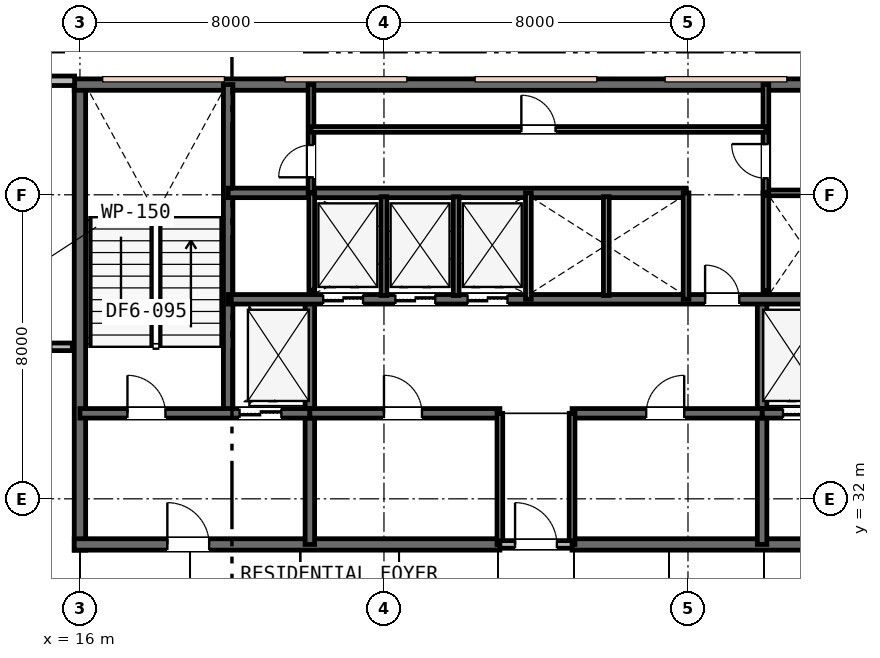
"""IFC4 building model, lengths in metres.
Left out: names, types, materials, properties, quantities, classifications, styles, units other than length and angle.
Written with IfcOpenShell. Run it as: python <this file> out.ifc"""

import sys

from ifc_helpers import new_model, si_unit, direction, frame, frame_2d, origin, place, context, subcontext, project, spatial, rectangle, extrude, element, fill, save


model = new_model("IFC4")
c1 = context("Model", 3, precision=1e-05, world=origin(), true_north=direction((0.0, 1.0)))
c2 = subcontext(c1, "Body", "Model", "MODEL_VIEW")
j1 = project(units=[si_unit("LENGTHUNIT", "METRE"), si_unit("PLANEANGLEUNIT", "RADIAN")], contexts=[c1])
p1 = place(None, origin())
s1 = spatial("IfcSite", under=j1, at=p1, CompositionType="ELEMENT")
p2 = place(p1, origin())
s2 = spatial("IfcBuilding", under=s1, at=p2, CompositionType="ELEMENT")
p3 = place(p2, frame((0.0, 0.0, 271.6)))
s3 = spatial("IfcBuildingStorey", under=s2, at=p3, CompositionType="ELEMENT", Elevation=271.6)
p4 = place(p3, frame((16.0, 30.65, 0.0), z_axis=(0.0, 0.0, 1.0), x_axis=(0.0, 1.0, 0.0)))
e1 = element("IfcWall", 1, at=p4, inside=s3, PredefinedType="SHEAR", context=c2, shape_type="SweptSolid", body=[
    extrude(rectangle(XDim=12.3, YDim=0.3, at=frame_2d((6.15, 0.0))), origin(), (0.0, 0.0, 1.0), 3.8),
])
p5 = place(p3, frame((15.85, 42.9, 0.0), z_axis=(0.0, 0.0, 1.0), x_axis=(1.0, 0.0, 0.0)))
e2 = element("IfcWall", 2, at=p5, inside=s3, PredefinedType="SHEAR", context=c2, shape_type="SweptSolid", body=[
    extrude(rectangle(XDim=24.3, YDim=0.3, at=frame_2d((12.15, 0.0))), origin(), (0.0, 0.0, 1.0), 3.8),
])
p6 = place(p3, frame((15.85, 30.8, 0.0), z_axis=(0.0, 0.0, 1.0), x_axis=(1.0, 0.0, 0.0)))
e3 = element("IfcWall", 3, at=p6, inside=s3, PredefinedType="SHEAR", context=c2, shape_type="SweptSolid", body=[
    extrude(rectangle(XDim=11.2, YDim=0.3, at=frame_2d((5.6, 0.0))), origin(), (0.0, 0.0, 1.0), 3.8),
])
p7 = place(p6, frame((2.45, 0.0, 0.0)))
e4 = element("IfcOpeningElement", 4, at=p7, cuts=e3, PredefinedType="OPENING", context=c2, shape_type="SweptSolid", body=[
    extrude(rectangle(XDim=1.1, YDim=2.15, at=frame_2d((0.55, 1.075))), frame((0.0, 0.16, 0.0), z_axis=(0.0, -1.0, 0.0), x_axis=(1.0, 0.0, 0.0)), (0.0, 0.0, 1.0), 0.32),
])
p8 = place(p3, frame((28.95, 30.8, 0.0), z_axis=(0.0, 0.0, 1.0), x_axis=(1.0, 0.0, 0.0)))
e5 = element("IfcWall", 5, at=p8, inside=s3, PredefinedType="SHEAR", context=c2, shape_type="SweptSolid", body=[
    extrude(rectangle(XDim=11.2, YDim=0.3, at=frame_2d((5.6, 0.0))), origin(), (0.0, 0.0, 1.0), 3.8),
])
p9 = place(p8, frame((7.65, 0.0, 0.0)))
e6 = element("IfcOpeningElement", 6, at=p9, cuts=e5, PredefinedType="OPENING", context=c2, shape_type="SweptSolid", body=[
    extrude(rectangle(XDim=1.1, YDim=2.15, at=frame_2d((0.55, 1.075))), frame((0.0, 0.16, 0.0), z_axis=(0.0, -1.0, 0.0), x_axis=(1.0, 0.0, 0.0)), (0.0, 0.0, 1.0), 0.32),
])
p10 = place(p3, frame((19.9, 34.25, 0.0), z_axis=(0.0, 0.0, 1.0), x_axis=(0.0, 1.0, 0.0)))
e7 = element("IfcWall", 7, at=p10, inside=s3, PredefinedType="SHEAR", context=c2, shape_type="SweptSolid", body=[
    extrude(rectangle(XDim=8.65, YDim=0.25, at=frame_2d((4.325, 0.0))), origin(), (0.0, 0.0, 1.0), 3.8),
])
for number, where, z_axis, x_axis in (
    (8, (22.05, 30.8, 0.0), (0.0, 0.0, 1.0), (0.0, 1.0, 0.0)),
    (9, (33.95, 30.8, 0.0), (0.0, 0.0, 1.0), (0.0, 1.0, 0.0)),
):
    element("IfcWall", number, at=place(p3, frame(where, z_axis=z_axis, x_axis=x_axis)), inside=s3, PredefinedType="SHEAR", context=c2, shape_type="SweptSolid", body=[
        extrude(rectangle(XDim=6.45, YDim=0.25, at=frame_2d((3.225, 0.0))), origin(), (0.0, 0.0, 1.0), 3.8),
    ])
p11 = place(p3, frame((16.0, 34.25, 0.0), z_axis=(0.0, 0.0, 1.0), x_axis=(1.0, 0.0, 0.0)))
e10 = element("IfcWall", 10, at=p11, inside=s3, PredefinedType="SHEAR", context=c2, shape_type="SweptSolid", body=[
    extrude(rectangle(XDim=6.05, YDim=0.25, at=frame_2d((3.025, 0.0))), origin(), (0.0, 0.0, 1.0), 3.8),
])
p12 = place(p11, frame((1.25, 0.0, 0.0)))
e11 = element("IfcOpeningElement", 11, at=p12, cuts=e10, PredefinedType="OPENING", context=c2, shape_type="SweptSolid", body=[
    extrude(rectangle(XDim=1.0, YDim=2.15, at=frame_2d((0.5, 1.075))), frame((0.0, 0.135, 0.0), z_axis=(0.0, -1.0, 0.0), x_axis=(1.0, 0.0, 0.0)), (0.0, 0.0, 1.0), 0.27),
])
p13 = place(p11, frame((4.2, 0.0, 0.0)))
e12 = element("IfcOpeningElement", 12, at=p13, cuts=e10, PredefinedType="OPENING", context=c2, shape_type="SweptSolid", body=[
    extrude(rectangle(XDim=1.1, YDim=2.15, at=frame_2d((0.55, 1.075))), frame((0.0, 0.135, 0.0), z_axis=(0.0, -1.0, 0.0), x_axis=(1.0, 0.0, 0.0)), (0.0, 0.0, 1.0), 0.27),
])
p14 = place(p3, frame((33.95, 34.25, 0.0), z_axis=(0.0, 0.0, 1.0), x_axis=(1.0, 0.0, 0.0)))
e13 = element("IfcWall", 13, at=p14, inside=s3, PredefinedType="SHEAR", context=c2, shape_type="SweptSolid", body=[
    extrude(rectangle(XDim=6.05, YDim=0.25, at=frame_2d((3.025, 0.0))), origin(), (0.0, 0.0, 1.0), 3.8),
])
p15 = place(p14, frame((3.7, 0.0, 0.0)))
e14 = element("IfcOpeningElement", 14, at=p15, cuts=e13, PredefinedType="OPENING", context=c2, shape_type="SweptSolid", body=[
    extrude(rectangle(XDim=1.0, YDim=2.15, at=frame_2d((0.5, 1.075))), frame((0.0, 0.135, 0.0), z_axis=(0.0, -1.0, 0.0), x_axis=(1.0, 0.0, 0.0)), (0.0, 0.0, 1.0), 0.27),
])
p16 = place(p14, frame((0.55, 0.0, 0.0)))
e15 = element("IfcOpeningElement", 15, at=p16, cuts=e13, PredefinedType="OPENING", context=c2, shape_type="SweptSolid", body=[
    extrude(rectangle(XDim=1.1, YDim=2.15, at=frame_2d((0.55, 1.075))), frame((0.0, 0.135, 0.0), z_axis=(0.0, -1.0, 0.0), x_axis=(1.0, 0.0, 0.0)), (0.0, 0.0, 1.0), 0.27),
])
p17 = place(p3, frame((22.05, 34.25, 0.0), z_axis=(0.0, 0.0, 1.0), x_axis=(1.0, 0.0, 0.0)))
e16 = element("IfcWall", 16, at=p17, inside=s3, PredefinedType="SHEAR", context=c2, shape_type="SweptSolid", body=[
    extrude(rectangle(XDim=5.0, YDim=0.25, at=frame_2d((2.5, 0.0))), origin(), (0.0, 0.0, 1.0), 3.8),
])
p18 = place(p17, frame((1.95, 0.0, 0.0)))
e17 = element("IfcOpeningElement", 17, at=p18, cuts=e16, PredefinedType="OPENING", context=c2, shape_type="SweptSolid", body=[
    extrude(rectangle(XDim=1.0, YDim=2.15, at=frame_2d((0.5, 1.075))), frame((0.0, 0.135, 0.0), z_axis=(0.0, -1.0, 0.0), x_axis=(1.0, 0.0, 0.0)), (0.0, 0.0, 1.0), 0.27),
])
p19 = place(p3, frame((28.95, 34.25, 0.0), z_axis=(0.0, 0.0, 1.0), x_axis=(1.0, 0.0, 0.0)))
e18 = element("IfcWall", 18, at=p19, inside=s3, PredefinedType="SHEAR", context=c2, shape_type="SweptSolid", body=[
    extrude(rectangle(XDim=5.0, YDim=0.25, at=frame_2d((2.5, 0.0))), origin(), (0.0, 0.0, 1.0), 3.8),
])
p20 = place(p19, frame((1.95, 0.0, 0.0)))
e19 = element("IfcOpeningElement", 19, at=p20, cuts=e18, PredefinedType="OPENING", context=c2, shape_type="SweptSolid", body=[
    extrude(rectangle(XDim=1.0, YDim=2.15, at=frame_2d((0.5, 1.075))), frame((0.0, 0.135, 0.0), z_axis=(0.0, -1.0, 0.0), x_axis=(1.0, 0.0, 0.0)), (0.0, 0.0, 1.0), 0.27),
])
p21 = place(p3, frame((19.9, 37.25, 0.0), z_axis=(0.0, 0.0, 1.0), x_axis=(1.0, 0.0, 0.0)))
e20 = element("IfcWall", 20, at=p21, inside=s3, PredefinedType="SHEAR", context=c2, shape_type="SweptSolid", body=[
    extrude(rectangle(XDim=16.2, YDim=0.25, at=frame_2d((8.1, 0.0))), origin(), (0.0, 0.0, 1.0), 3.8),
])
p22 = place(p21, frame((12.55, 0.0, 0.0)))
e21 = element("IfcOpeningElement", 21, at=p22, cuts=e20, PredefinedType="OPENING", context=c2, shape_type="SweptSolid", body=[
    extrude(rectangle(XDim=0.9, YDim=2.15, at=frame_2d((0.45, 1.075))), frame((0.0, 0.135, 0.0), z_axis=(0.0, -1.0, 0.0), x_axis=(1.0, 0.0, 0.0)), (0.0, 0.0, 1.0), 0.27),
])
p23 = place(p21, frame((2.5, 0.0, 0.0)))
e22 = element("IfcOpeningElement", 22, at=p23, cuts=e20, PredefinedType="OPENING", context=c2, shape_type="SweptSolid", body=[
    extrude(rectangle(XDim=1.05, YDim=2.15, at=frame_2d((0.525, 1.075))), frame((0.0, 0.135, 0.0), z_axis=(0.0, -1.0, 0.0), x_axis=(1.0, 0.0, 0.0)), (0.0, 0.0, 1.0), 0.27),
])
p24 = place(p21, frame((4.4, 0.0, 0.0)))
e23 = element("IfcOpeningElement", 23, at=p24, cuts=e20, PredefinedType="OPENING", context=c2, shape_type="SweptSolid", body=[
    extrude(rectangle(XDim=1.05, YDim=2.15, at=frame_2d((0.525, 1.075))), frame((0.0, 0.135, 0.0), z_axis=(0.0, -1.0, 0.0), x_axis=(1.0, 0.0, 0.0)), (0.0, 0.0, 1.0), 0.27),
])
p25 = place(p21, frame((6.3, 0.0, 0.0)))
e24 = element("IfcOpeningElement", 24, at=p25, cuts=e20, PredefinedType="OPENING", context=c2, shape_type="SweptSolid", body=[
    extrude(rectangle(XDim=1.05, YDim=2.15, at=frame_2d((0.525, 1.075))), frame((0.0, 0.135, 0.0), z_axis=(0.0, -1.0, 0.0), x_axis=(1.0, 0.0, 0.0)), (0.0, 0.0, 1.0), 0.27),
])
p26 = place(p3, frame((19.9, 40.05, 0.0), z_axis=(0.0, 0.0, 1.0), x_axis=(1.0, 0.0, 0.0)))
e25 = element("IfcWall", 25, at=p26, inside=s3, PredefinedType="SHEAR", context=c2, shape_type="SweptSolid", body=[
    extrude(rectangle(XDim=12.05, YDim=0.25, at=frame_2d((6.025, 0.0))), origin(), (0.0, 0.0, 1.0), 3.8),
])
p27 = place(p3, frame((15.86, 43.0, 0.0), z_axis=(0.0, 0.0, 1.0), x_axis=(-1.0, 0.0, 0.0)))
e26 = element("IfcWall", 26, at=p27, inside=s3, PredefinedType="STANDARD", context=c2, shape_type="SweptSolid", body=[
    extrude(rectangle(XDim=4.06, YDim=0.25, at=frame_2d((2.03, 0.0))), origin(), (0.0, 0.0, 1.0), 3.53),
])
p28 = place(p27, frame((1.14, 0.0, 0.85)))
e27 = element("IfcOpeningElement", 27, at=p28, cuts=e26, PredefinedType="OPENING", context=c2, shape_type="SweptSolid", body=[
    extrude(rectangle(XDim=1.2, YDim=1.6, at=frame_2d((0.6, 0.8))), frame((0.0, 0.135, 0.0), z_axis=(0.0, -1.0, 0.0), x_axis=(1.0, 0.0, 0.0)), (0.0, 0.0, 1.0), 0.27),
])
for number, where, z_axis, x_axis in (
    (28, (27.05, 30.8, 0.0), (0.0, 0.0, 1.0), (0.0, 1.0, 0.0)),
    (29, (28.95, 30.8, 0.0), (0.0, 0.0, 1.0), (0.0, 1.0, 0.0)),
):
    element("IfcWall", number, at=place(p3, frame(where, z_axis=z_axis, x_axis=x_axis)), inside=s3, PredefinedType="PLUMBINGWALL", context=c2, shape_type="SweptSolid", body=[
        extrude(rectangle(XDim=3.45, YDim=0.15, at=frame_2d((1.725, 0.0))), origin(), (0.0, 0.0, 1.0), 3.28),
    ])
p29 = place(p3, frame((27.05, 30.8, 0.0), z_axis=(0.0, 0.0, 1.0), x_axis=(1.0, 0.0, 0.0)))
e30 = element("IfcWall", 30, at=p29, inside=s3, PredefinedType="PARTITIONING", context=c2, shape_type="SweptSolid", body=[
    extrude(rectangle(XDim=1.9, YDim=0.2, at=frame_2d((0.95, 0.0))), origin(), (0.0, 0.0, 1.0), 3.28),
])
p30 = place(p29, frame((0.4, 0.0, 0.0)))
e31 = element("IfcOpeningElement", 31, at=p30, cuts=e30, PredefinedType="OPENING", context=c2, shape_type="SweptSolid", body=[
    extrude(rectangle(XDim=1.1, YDim=2.15, at=frame_2d((0.55, 1.075))), frame((0.0, 0.11, 0.0), z_axis=(0.0, -1.0, 0.0), x_axis=(1.0, 0.0, 0.0)), (0.0, 0.0, 1.0), 0.22),
])
p31 = place(p3, frame((22.1, 37.49, 0.0), z_axis=(0.0, 0.0, 1.0), x_axis=(0.0, 1.0, 0.0)))
e32 = element("IfcWall", 32, at=p31, inside=s3, PredefinedType="PLUMBINGWALL", context=c2, shape_type="SweptSolid", body=[
    extrude(rectangle(XDim=2.56, YDim=0.15, at=frame_2d((1.28, 0.0))), origin(), (0.0, 0.0, 1.0), 3.53),
])
p32 = place(p3, frame((27.8, 37.25, 0.0), z_axis=(0.0, 0.0, 1.0), x_axis=(0.0, 1.0, 0.0)))
e33 = element("IfcWall", 33, at=p32, inside=s3, PredefinedType="PLUMBINGWALL", context=c2, shape_type="SweptSolid", body=[
    extrude(rectangle(XDim=2.8, YDim=0.15, at=frame_2d((1.4, 0.0))), origin(), (0.0, 0.0, 1.0), 3.53),
])
for number, where, z_axis, x_axis in (
    (34, (24.0, 37.35, 0.0), (0.0, 0.0, 1.0), (0.0, 1.0, 0.0)),
    (35, (25.9, 37.35, 0.0), (0.0, 0.0, 1.0), (0.0, 1.0, 0.0)),
):
    element("IfcWall", number, at=place(p3, frame(where, z_axis=z_axis, x_axis=x_axis)), inside=s3, PredefinedType="PLUMBINGWALL", context=c2, shape_type="SweptSolid", body=[
        extrude(rectangle(XDim=2.6, YDim=0.15, at=frame_2d((1.3, 0.0))), origin(), (0.0, 0.0, 1.0), 3.53),
    ])
p33 = place(p3, frame((31.95, 37.25, 0.0), z_axis=(0.0, 0.0, 1.0), x_axis=(0.0, 1.0, 0.0)))
e36 = element("IfcWall", 36, at=p33, inside=s3, PredefinedType="PLUMBINGWALL", context=c2, shape_type="SweptSolid", body=[
    extrude(rectangle(XDim=2.8, YDim=0.15, at=frame_2d((1.4, 0.0))), origin(), (0.0, 0.0, 1.0), 3.53),
])
p34 = place(p3, frame((29.85, 37.35, 0.0), z_axis=(0.0, 0.0, 1.0), x_axis=(0.0, 1.0, 0.0)))
e37 = element("IfcWall", 37, at=p34, inside=s3, PredefinedType="PLUMBINGWALL", context=c2, shape_type="SweptSolid", body=[
    extrude(rectangle(XDim=2.6, YDim=0.15, at=frame_2d((1.3, 0.0))), origin(), (0.0, 0.0, 1.0), 3.53),
])
p35 = place(p3, frame((34.05, 37.473, 0.0), z_axis=(0.0, 0.0, 1.0), x_axis=(0.0, 1.0, 0.0)))
e38 = element("IfcWall", 38, at=p35, inside=s3, PredefinedType="PLUMBINGWALL", context=c2, shape_type="SweptSolid", body=[
    extrude(rectangle(XDim=2.577, YDim=0.15, at=frame_2d((1.288, 0.0))), origin(), (0.0, 0.0, 1.0), 3.53),
])
p36 = place(p3, frame((34.05, 40.05, 0.0), z_axis=(0.0, 0.0, 1.0), x_axis=(1.0, 0.0, 0.0)))
e39 = element("IfcWall", 39, at=p36, inside=s3, PredefinedType="PARTITIONING", context=c2, shape_type="SweptSolid", body=[
    extrude(rectangle(XDim=2.05, YDim=0.15, at=frame_2d((1.025, 0.0))), origin(), (0.0, 0.0, 1.0), 3.53),
])
p37 = place(p3, frame((34.05, 40.05, 0.0), z_axis=(0.0, 0.0, 1.0), x_axis=(0.0, 1.0, 0.0)))
e40 = element("IfcWall", 40, at=p37, inside=s3, PredefinedType="PARTITIONING", context=c2, shape_type="SweptSolid", body=[
    extrude(rectangle(XDim=2.85, YDim=0.15, at=frame_2d((1.425, 0.0))), origin(), (0.0, 0.0, 1.0), 3.53),
])
p38 = place(p37, frame((0.385, 0.0, 0.0)))
e41 = element("IfcOpeningElement", 41, at=p38, cuts=e40, PredefinedType="OPENING", context=c2, shape_type="SweptSolid", body=[
    extrude(rectangle(XDim=0.9, YDim=2.15, at=frame_2d((0.45, 1.075))), frame((0.0, 0.085, 0.0), z_axis=(0.0, -1.0, 0.0), x_axis=(1.0, 0.0, 0.0)), (0.0, 0.0, 1.0), 0.17),
])
p39 = place(p3, frame((22.08, 40.05, 0.0), z_axis=(0.0, 0.0, 1.0), x_axis=(0.0, 1.0, 0.0)))
e42 = element("IfcWall", 42, at=p39, inside=s3, PredefinedType="PARTITIONING", context=c2, shape_type="SweptSolid", body=[
    extrude(rectangle(XDim=2.85, YDim=0.15, at=frame_2d((1.425, 0.0))), origin(), (0.0, 0.0, 1.0), 3.53),
])
p40 = place(p39, frame((0.41, 0.0, 0.0)))
e43 = element("IfcOpeningElement", 43, at=p40, cuts=e42, PredefinedType="OPENING", context=c2, shape_type="SweptSolid", body=[
    extrude(rectangle(XDim=0.85, YDim=2.15, at=frame_2d((0.425, 1.075))), frame((0.0, 0.085, 0.0), z_axis=(0.0, -1.0, 0.0), x_axis=(1.0, 0.0, 0.0)), (0.0, 0.0, 1.0), 0.17),
])
p41 = place(p3, frame((22.08, 41.72, 0.0), z_axis=(0.0, 0.0, 1.0), x_axis=(1.0, 0.0, 0.0)))
e44 = element("IfcWall", 44, at=p41, inside=s3, PredefinedType="PARTITIONING", context=c2, shape_type="SweptSolid", body=[
    extrude(rectangle(XDim=11.97, YDim=0.15, at=frame_2d((5.985, 0.0))), origin(), (0.0, 0.0, 1.0), 3.53),
])
p42 = place(p41, frame((5.535, 0.0, 0.0)))
e45 = element("IfcOpeningElement", 45, at=p42, cuts=e44, PredefinedType="OPENING", context=c2, shape_type="SweptSolid", body=[
    extrude(rectangle(XDim=0.9, YDim=2.15, at=frame_2d((0.45, 1.075))), frame((0.0, 0.085, 0.0), z_axis=(0.0, -1.0, 0.0), x_axis=(1.0, 0.0, 0.0)), (0.0, 0.0, 1.0), 0.17),
])
p43 = place(p3, frame((9.3, 36.0, 0.0), z_axis=(0.0, 0.0, 1.0), x_axis=(1.0, 0.0, 0.0)))
e46 = element("IfcWall", 46, at=p43, inside=s3, PredefinedType="PARTITIONING", context=c2, shape_type="SweptSolid", body=[
    extrude(rectangle(XDim=6.5, YDim=0.2, at=frame_2d((3.25, 0.0))), origin(), (0.0, 0.0, 1.0), 3.53),
])
p44 = place(p43, frame((4.995, 0.0, 0.0)))
e47 = element("IfcOpeningElement", 47, at=p44, cuts=e46, PredefinedType="OPENING", context=c2, shape_type="SweptSolid", body=[
    extrude(rectangle(XDim=0.95, YDim=2.15, at=frame_2d((0.475, 1.075))), frame((0.0, 0.11, 0.0), z_axis=(0.0, -1.0, 0.0), x_axis=(1.0, 0.0, 0.0)), (0.0, 0.0, 1.0), 0.22),
])
p45 = place(p30, origin())
e48 = element("IfcDoor", 48, at=p45, inside=s3, OperationType="SINGLE_SWING_LEFT", PredefinedType="DOOR", context=c2, shape_type="SweptSolid", body=[
    extrude(rectangle(XDim=1.1, YDim=2.15, at=frame_2d((0.55, 1.075))), frame((0.0, 0.025, 0.0), z_axis=(0.0, -1.0, 0.0), x_axis=(1.0, 0.0, 0.0)), (0.0, 0.0, 1.0), 0.05),
])
fill(e31, e48)
p46 = place(p12, origin())
e49 = element("IfcDoor", 49, at=p46, inside=s3, OperationType="SINGLE_SWING_LEFT", PredefinedType="DOOR", context=c2, shape_type="SweptSolid", body=[
    extrude(rectangle(XDim=1.0, YDim=2.15, at=frame_2d((0.5, 1.075))), frame((0.0, 0.025, 0.0), z_axis=(0.0, -1.0, 0.0), x_axis=(1.0, 0.0, 0.0)), (0.0, 0.0, 1.0), 0.05),
])
fill(e11, e49)
p47 = place(p7, origin())
e50 = element("IfcDoor", 50, at=p47, inside=s3, OperationType="SINGLE_SWING_LEFT", PredefinedType="DOOR", context=c2, shape_type="SweptSolid", body=[
    extrude(rectangle(XDim=1.1, YDim=2.15, at=frame_2d((0.55, 1.075))), frame((0.0, 0.025, 0.0), z_axis=(0.0, -1.0, 0.0), x_axis=(1.0, 0.0, 0.0)), (0.0, 0.0, 1.0), 0.05),
])
fill(e4, e50)
p48 = place(p18, origin())
e51 = element("IfcDoor", 51, at=p48, inside=s3, OperationType="SINGLE_SWING_LEFT", PredefinedType="DOOR", context=c2, shape_type="SweptSolid", body=[
    extrude(rectangle(XDim=1.0, YDim=2.15, at=frame_2d((0.5, 1.075))), frame((0.0, 0.025, 0.0), z_axis=(0.0, -1.0, 0.0), x_axis=(1.0, 0.0, 0.0)), (0.0, 0.0, 1.0), 0.05),
])
fill(e17, e51)
p49 = place(p20, origin())
e52 = element("IfcDoor", 52, at=p49, inside=s3, OperationType="SINGLE_SWING_RIGHT", PredefinedType="DOOR", context=c2, shape_type="SweptSolid", body=[
    extrude(rectangle(XDim=1.0, YDim=2.15, at=frame_2d((0.5, 1.075))), frame((0.0, 0.025, 0.0), z_axis=(0.0, -1.0, 0.0), x_axis=(1.0, 0.0, 0.0)), (0.0, 0.0, 1.0), 0.05),
])
fill(e19, e52)
p50 = place(p22, origin())
e53 = element("IfcDoor", 53, at=p50, inside=s3, OperationType="SINGLE_SWING_LEFT", PredefinedType="DOOR", context=c2, shape_type="SweptSolid", body=[
    extrude(rectangle(XDim=0.9, YDim=2.15, at=frame_2d((0.45, 1.075))), frame((0.0, 0.025, 0.0), z_axis=(0.0, -1.0, 0.0), x_axis=(1.0, 0.0, 0.0)), (0.0, 0.0, 1.0), 0.05),
])
fill(e21, e53)
p51 = place(p38, origin())
e54 = element("IfcDoor", 54, at=p51, inside=s3, OperationType="SINGLE_SWING_RIGHT", PredefinedType="DOOR", context=c2, shape_type="SweptSolid", body=[
    extrude(rectangle(XDim=0.9, YDim=2.15, at=frame_2d((0.45, 1.075))), frame((0.0, 0.025, 0.0), z_axis=(0.0, -1.0, 0.0), x_axis=(1.0, 0.0, 0.0)), (0.0, 0.0, 1.0), 0.05),
])
fill(e41, e54)
p52 = place(p40, origin())
e55 = element("IfcDoor", 55, at=p52, inside=s3, OperationType="SINGLE_SWING_LEFT", PredefinedType="DOOR", context=c2, shape_type="SweptSolid", body=[
    extrude(rectangle(XDim=0.85, YDim=2.15, at=frame_2d((0.425, 1.075))), frame((0.0, 0.025, 0.0), z_axis=(0.0, -1.0, 0.0), x_axis=(1.0, 0.0, 0.0)), (0.0, 0.0, 1.0), 0.05),
])
fill(e43, e55)
p53 = place(p42, origin())
e56 = element("IfcDoor", 56, at=p53, inside=s3, OperationType="SINGLE_SWING_LEFT", PredefinedType="DOOR", context=c2, shape_type="SweptSolid", body=[
    extrude(rectangle(XDim=0.9, YDim=2.15, at=frame_2d((0.45, 1.075))), frame((0.0, 0.025, 0.0), z_axis=(0.0, -1.0, 0.0), x_axis=(1.0, 0.0, 0.0)), (0.0, 0.0, 1.0), 0.05),
])
fill(e45, e56)
p54 = place(p13, origin())
e57 = element("IfcDoor", 57, at=p54, inside=s3, OperationType="DOUBLE_DOOR_SLIDING", PredefinedType="DOOR", context=c2, shape_type="SweptSolid", body=[
    extrude(rectangle(XDim=1.1, YDim=2.15, at=frame_2d((0.55, 1.075))), frame((0.0, 0.025, 0.0), z_axis=(0.0, -1.0, 0.0), x_axis=(1.0, 0.0, 0.0)), (0.0, 0.0, 1.0), 0.05),
])
fill(e12, e57)
p55 = place(p16, origin())
e58 = element("IfcDoor", 58, at=p55, inside=s3, OperationType="DOUBLE_DOOR_SLIDING", PredefinedType="DOOR", context=c2, shape_type="SweptSolid", body=[
    extrude(rectangle(XDim=1.1, YDim=2.15, at=frame_2d((0.55, 1.075))), frame((0.0, 0.025, 0.0), z_axis=(0.0, -1.0, 0.0), x_axis=(1.0, 0.0, 0.0)), (0.0, 0.0, 1.0), 0.05),
])
fill(e15, e58)
p56 = place(p23, origin())
e59 = element("IfcDoor", 59, at=p56, inside=s3, OperationType="DOUBLE_DOOR_SLIDING", PredefinedType="DOOR", context=c2, shape_type="SweptSolid", body=[
    extrude(rectangle(XDim=1.05, YDim=2.15, at=frame_2d((0.525, 1.075))), frame((0.0, 0.025, 0.0), z_axis=(0.0, -1.0, 0.0), x_axis=(1.0, 0.0, 0.0)), (0.0, 0.0, 1.0), 0.05),
])
fill(e22, e59)
p57 = place(p24, origin())
e60 = element("IfcDoor", 60, at=p57, inside=s3, OperationType="DOUBLE_DOOR_SLIDING", PredefinedType="DOOR", context=c2, shape_type="SweptSolid", body=[
    extrude(rectangle(XDim=1.05, YDim=2.15, at=frame_2d((0.525, 1.075))), frame((0.0, 0.025, 0.0), z_axis=(0.0, -1.0, 0.0), x_axis=(1.0, 0.0, 0.0)), (0.0, 0.0, 1.0), 0.05),
])
fill(e23, e60)
p58 = place(p25, origin())
e61 = element("IfcDoor", 61, at=p58, inside=s3, OperationType="DOUBLE_DOOR_SLIDING", PredefinedType="DOOR", context=c2, shape_type="SweptSolid", body=[
    extrude(rectangle(XDim=1.05, YDim=2.15, at=frame_2d((0.525, 1.075))), frame((0.0, 0.025, 0.0), z_axis=(0.0, -1.0, 0.0), x_axis=(1.0, 0.0, 0.0)), (0.0, 0.0, 1.0), 0.05),
])
fill(e24, e61)
save(model, sys.argv[1])
